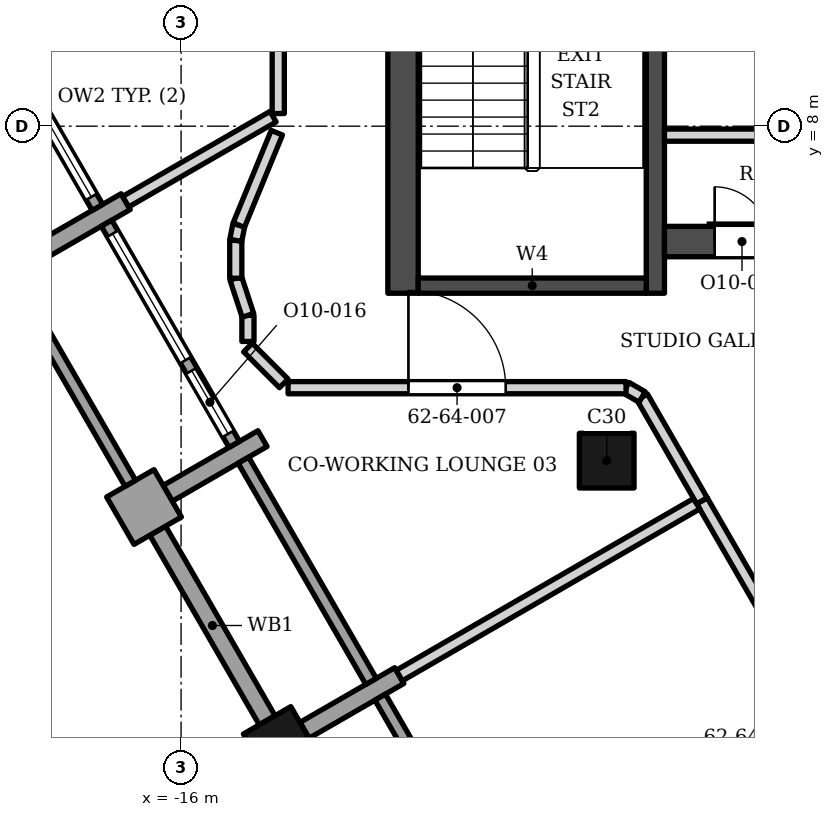
"""IFC4 building model, lengths in metres.
Left out: names, types, materials, properties, quantities, classifications, styles, units other than length and angle.
Written with IfcOpenShell. Run it as: python <this file> out.ifc"""

import sys

from ifc_helpers import new_model, si_unit, direction, frame, frame_2d, origin, origin_2d, place, context, subcontext, project, spatial, rectangle, extrude, element, fill, save


model = new_model("IFC4")
c1 = context("Model", 3, precision=1e-05, world=origin(), true_north=direction((0.0, 1.0)))
c2 = subcontext(c1, "Body", "Model", "MODEL_VIEW")
j1 = project(units=[si_unit("LENGTHUNIT", "METRE"), si_unit("PLANEANGLEUNIT", "RADIAN")], contexts=[c1])
p1 = place(None, origin())
s1 = spatial("IfcSite", under=j1, at=p1, CompositionType="ELEMENT")
p2 = place(p1, origin())
s2 = spatial("IfcBuilding", under=s1, at=p2, CompositionType="ELEMENT")
p3 = place(p2, frame((0.0, 0.0, 259.9)))
s3 = spatial("IfcBuildingStorey", under=s2, at=p3, CompositionType="ELEMENT", Elevation=259.9)
p4 = place(p3, frame((-12.35, 5.253, 0.0), z_axis=(0.0, 0.0, 1.0), x_axis=(0.0, 1.0, 0.0)))
e1 = element("IfcWall", 1, at=p4, inside=s3, PredefinedType="SHEAR", context=c2, shape_type="SweptSolid", body=[
    extrude(rectangle(XDim=13.8, YDim=0.5, at=frame_2d((6.9, 0.0))), origin(), (0.0, 0.0, 1.0), 3.9),
])
p5 = place(p3, frame((-8.2, 5.253, 0.0), z_axis=(0.0, 0.0, 1.0), x_axis=(0.0, 1.0, 0.0)))
e2 = element("IfcWall", 2, at=p5, inside=s3, PredefinedType="SHEAR", context=c2, shape_type="SweptSolid", body=[
    extrude(rectangle(XDim=13.3, YDim=0.3, at=frame_2d((6.65, 0.0))), origin(), (0.0, 0.0, 1.0), 3.9),
])
p6 = place(p5, frame((7.1, 0.0, 0.0)))
e3 = element("IfcOpeningElement", 3, at=p6, cuts=e2, PredefinedType="OPENING", context=c2, shape_type="SweptSolid", body=[
    extrude(rectangle(XDim=1.4, YDim=2.1, at=frame_2d((0.7, 1.05))), frame((0.0, 0.16, 0.0), z_axis=(0.0, -1.0, 0.0), x_axis=(1.0, 0.0, 0.0)), (0.0, 0.0, 1.0), 0.32),
])
p7 = place(p5, frame((5.05, 0.0, 0.0)))
e4 = element("IfcOpeningElement", 4, at=p7, cuts=e2, PredefinedType="OPENING", context=c2, shape_type="SweptSolid", body=[
    extrude(rectangle(XDim=1.4, YDim=2.1, at=frame_2d((0.7, 1.05))), frame((0.0, 0.16, 0.0), z_axis=(0.0, -1.0, 0.0), x_axis=(1.0, 0.0, 0.0)), (0.0, 0.0, 1.0), 0.32),
])
p8 = place(p3, frame((-12.1, 5.378, 0.0), z_axis=(0.0, 0.0, 1.0), x_axis=(1.0, 0.0, 0.0)))
e5 = element("IfcWall", 5, at=p8, inside=s3, PredefinedType="SHEAR", context=c2, shape_type="SweptSolid", body=[
    extrude(rectangle(XDim=3.75, YDim=0.25, at=frame_2d((1.875, 0.0))), origin(), (0.0, 0.0, 1.0), 3.9),
])
p9 = place(p3, frame((-8.05, 6.103, 0.0), z_axis=(0.0, 0.0, 1.0), x_axis=(1.0, 0.0, 0.0)))
e6 = element("IfcWall", 6, at=p9, inside=s3, PredefinedType="SHEAR", context=c2, shape_type="SweptSolid", body=[
    extrude(rectangle(XDim=7.05, YDim=0.5, at=frame_2d((3.525, 0.0))), origin(), (0.0, 0.0, 1.0), 3.9),
])
p10 = place(p9, frame((0.825, 0.0, 0.0)))
e7 = element("IfcOpeningElement", 7, at=p10, cuts=e6, PredefinedType="OPENING", context=c2, shape_type="SweptSolid", body=[
    extrude(rectangle(XDim=0.9, YDim=2.1, at=frame_2d((0.45, 1.05))), frame((0.0, 0.26, 0.0), z_axis=(0.0, -1.0, 0.0), x_axis=(1.0, 0.0, 0.0)), (0.0, 0.0, 1.0), 0.52),
])
for number, where, z_axis, x_axis in (
    (8, (-9.0, 2.5, 0.0), (0.0, 0.0, 1.0), (1.0, 0.0, 0.0)),
    (9, (-14.36, -2.16, 0.0), (0.0, 0.0, 1.0), (0.5, -0.866, 0.0)),
):
    element("IfcColumn", number, at=place(p3, frame(where, z_axis=z_axis, x_axis=x_axis)), inside=s3, PredefinedType="COLUMN", context=c2, shape_type="SweptSolid", body=[
        extrude(rectangle(XDim=0.9, YDim=0.9, at=origin_2d()), origin(), (0.0, 0.0, 1.0), 3.9),
    ])
p11 = place(p3, frame((-16.911, 6.759, 0.0), z_axis=(0.0, 0.0, 1.0), x_axis=(-0.866047807691, -0.499961193289, 0.0)))
e10 = element("IfcWall", 10, at=p11, inside=s3, PredefinedType="SOLIDWALL", context=c2, shape_type="SweptSolid", body=[
    extrude(rectangle(XDim=1.8, YDim=0.3, at=frame_2d((0.9, 0.0))), origin(), (0.0, 0.0, 1.0), 2.95),
])
p12 = place(p3, frame((-16.834, 2.127, 0.0), z_axis=(0.0, 0.0, 1.0), x_axis=(0.499902469156, -0.866081705922, 0.0)))
e11 = element("IfcWall", 11, at=p12, inside=s3, PredefinedType="SOLIDWALL", context=c2, shape_type="SweptSolid", body=[
    extrude(rectangle(XDim=0.9, YDim=0.9, at=frame_2d((0.45, 0.0))), origin(), (0.0, 0.0, 1.0), 3.0),
])
for number, where, z_axis, x_axis in (
    (12, (-16.22, 1.962, 0.0), (0.0, 0.0, 1.0), (0.866, 0.5, 0.0)),
    (13, (-12.411, -1.035, 0.0), (0.0, 0.0, 1.0), (-0.866, -0.5, 0.0)),
):
    element("IfcWall", number, at=place(p3, frame(where, z_axis=z_axis, x_axis=x_axis)), inside=s3, PredefinedType="SOLIDWALL", context=c2, shape_type="SweptSolid", body=[
        extrude(rectangle(XDim=1.8, YDim=0.3, at=frame_2d((0.9, 0.0))), origin(), (0.0, 0.0, 1.0), 3.0),
    ])
p13 = place(p3, frame((-19.476, 10.302, 0.0), z_axis=(0.0, 0.0, 1.0), x_axis=(0.49998411664, -0.866034573852, 0.0)))
e14 = element("IfcWall", 14, at=p13, inside=s3, PredefinedType="ELEMENTEDWALL", context=c2, shape_type="SweptSolid", body=[
    extrude(rectangle(XDim=4.2, YDim=0.2, at=frame_2d((2.1, 0.0))), origin(), (0.0, 0.0, 1.0), 3.0),
])
p14 = place(p13, frame((0.2, 0.0, 0.45)))
e15 = element("IfcOpeningElement", 15, at=p14, cuts=e14, PredefinedType="OPENING", context=c2, shape_type="SweptSolid", body=[
    extrude(rectangle(XDim=3.8, YDim=2.25, at=frame_2d((1.9, 1.125))), frame((0.0, 0.11, 0.0), z_axis=(0.0, -1.0, 0.0), x_axis=(1.0, 0.0, 0.0)), (0.0, 0.0, 1.0), 0.22),
])
p15 = place(p3, frame((-18.635, 5.245, 0.0), z_axis=(0.0, 0.0, 1.0), x_axis=(0.500012057535, -0.866018442252, 0.0)))
e16 = element("IfcWall", 16, at=p15, inside=s3, PredefinedType="SOLIDWALL", context=c2, shape_type="SweptSolid", body=[
    extrude(rectangle(XDim=3.6, YDim=0.2, at=frame_2d((1.8, 0.0))), origin(), (0.0, 0.0, 1.0), 3.0),
])
p16 = place(p3, frame((-17.226, 6.405, 0.0), z_axis=(0.0, 0.0, 1.0), x_axis=(0.499958946799, -0.866049104564, 0.0)))
e17 = element("IfcWall", 17, at=p16, inside=s3, PredefinedType="ELEMENTEDWALL", context=c2, shape_type="SweptSolid", body=[
    extrude(rectangle(XDim=4.2, YDim=0.2, at=frame_2d((2.1, 0.0))), origin(), (0.0, 0.0, 1.0), 2.95),
])
p17 = place(p16, frame((0.2, 0.0, 0.45)))
e18 = element("IfcOpeningElement", 18, at=p17, cuts=e17, PredefinedType="OPENING", context=c2, shape_type="SweptSolid", body=[
    extrude(rectangle(XDim=2.4, YDim=2.25, at=frame_2d((1.2, 1.125))), frame((0.0, 0.11, 0.0), z_axis=(0.0, -1.0, 0.0), x_axis=(1.0, 0.0, 0.0)), (0.0, 0.0, 1.0), 0.22),
])
p18 = place(p16, frame((2.8, 0.0, 0.0)))
e19 = element("IfcOpeningElement", 19, at=p18, cuts=e17, PredefinedType="OPENING", context=c2, shape_type="SweptSolid", body=[
    extrude(rectangle(XDim=1.2, YDim=2.7, at=frame_2d((0.6, 1.35))), frame((0.0, 0.11, 0.0), z_axis=(0.0, -1.0, 0.0), x_axis=(1.0, 0.0, 0.0)), (0.0, 0.0, 1.0), 0.22),
])
p19 = place(p3, frame((-16.385, 1.347, 0.0), z_axis=(0.0, 0.0, 1.0), x_axis=(0.500012057535, -0.866018442252, 0.0)))
e20 = element("IfcWall", 20, at=p19, inside=s3, PredefinedType="SOLIDWALL", context=c2, shape_type="SweptSolid", body=[
    extrude(rectangle(XDim=3.6, YDim=0.3, at=frame_2d((1.8, 0.0))), origin(), (0.0, 0.0, 1.0), 3.0),
])
for number, where, z_axis, x_axis in (
    (21, (-14.976, 2.507, 0.0), (0.0, 0.0, 1.0), (0.5, -0.866, 0.0)),
    (22, (-12.726, -1.39, 0.0), (0.0, 0.0, 1.0), (0.5, -0.866, 0.0)),
):
    element("IfcWall", number, at=place(p3, frame(where, z_axis=z_axis, x_axis=x_axis)), inside=s3, PredefinedType="ELEMENTEDWALL", context=c2, shape_type="SweptSolid", body=[
        extrude(rectangle(XDim=4.2, YDim=0.2, at=frame_2d((2.1, 0.0))), origin(), (0.0, 0.0, 1.0), 3.0),
    ])
p20 = place(p3, frame((-8.05, 7.853, 0.0), z_axis=(0.0, 0.0, 1.0), x_axis=(1.0, 0.0, 0.0)))
e23 = element("IfcWall", 23, at=p20, inside=s3, PredefinedType="SOLIDWALL", context=c2, shape_type="SweptSolid", body=[
    extrude(rectangle(XDim=2.5, YDim=0.2, at=frame_2d((1.25, 0.0))), origin(), (0.0, 0.0, 1.0), 3.73),
])
p21 = place(p3, frame((-7.433, 1.839, 0.0), z_axis=(0.0, 0.0, 1.0), x_axis=(0.500005992518, -0.866021943975, 0.0)))
e24 = element("IfcWall", 24, at=p21, inside=s3, PredefinedType="PARTITIONING", context=c2, shape_type="SweptSolid", body=[
    extrude(rectangle(XDim=13.764, YDim=0.2, at=frame_2d((6.882, 0.0))), origin(), (0.0, 0.0, 1.0), 2.884),
])
p22 = place(p21, frame((3.7, 0.0, 0.0)))
e25 = element("IfcOpeningElement", 25, at=p22, cuts=e24, PredefinedType="OPENING", context=c2, shape_type="SweptSolid", body=[
    extrude(rectangle(XDim=1.6, YDim=2.1, at=frame_2d((0.8, 1.05))), frame((0.0, 0.11, 0.0), z_axis=(0.0, -1.0, 0.0), x_axis=(1.0, 0.0, 0.0)), (0.0, 0.0, 1.0), 0.22),
])
p23 = place(p21, frame((10.85, 0.0, 0.0)))
e26 = element("IfcOpeningElement", 26, at=p23, cuts=e24, PredefinedType="OPENING", context=c2, shape_type="SweptSolid", body=[
    extrude(rectangle(XDim=0.8, YDim=2.1, at=frame_2d((0.4, 1.05))), frame((0.0, 0.11, 0.0), z_axis=(0.0, -1.0, 0.0), x_axis=(1.0, 0.0, 0.0)), (0.0, 0.0, 1.0), 0.22),
])
p24 = place(p3, frame((-12.411, -1.034, 0.0), z_axis=(0.0, 0.0, 1.0), x_axis=(0.865901262238, 0.500214957848, 0.0)))
e27 = element("IfcWall", 27, at=p24, inside=s3, PredefinedType="PARTITIONING", context=c2, shape_type="SweptSolid", body=[
    extrude(rectangle(XDim=5.649, YDim=0.2, at=frame_2d((2.825, 0.0))), origin(), (0.0, 0.0, 1.0), 3.052),
])
p25 = place(p3, frame((-8.417, 3.546, 0.0), z_axis=(0.0, 0.0, 1.0), x_axis=(0.499325430766, -0.866414516378, 0.0)))
e28 = element("IfcWall", 28, at=p25, inside=s3, PredefinedType="PARTITIONING", context=c2, shape_type="SweptSolid", body=[
    extrude(rectangle(XDim=1.97, YDim=0.2, at=frame_2d((0.985, 0.0))), origin(), (0.0, 0.0, 1.0), 3.73),
])
p26 = place(p3, frame((-8.682, 3.699, 0.0), z_axis=(0.0, 0.0, 1.0), x_axis=(0.866026229868, -0.499998569178, 0.0)))
e29 = element("IfcWall", 29, at=p26, inside=s3, PredefinedType="PARTITIONING", context=c2, shape_type="SweptSolid", body=[
    extrude(rectangle(XDim=0.306, YDim=0.2, at=frame_2d((0.153, 0.0))), origin(), (0.0, 0.0, 1.0), 3.73),
])
p27 = place(p3, frame((-14.24, 3.7, 0.0), z_axis=(0.0, 0.0, 1.0), x_axis=(0.999999999035, -4.3925151e-05, 0.0)))
e30 = element("IfcWall", 30, at=p27, inside=s3, PredefinedType="PARTITIONING", context=c2, shape_type="SweptSolid", body=[
    extrude(rectangle(XDim=5.558, YDim=0.2, at=frame_2d((2.779, 0.0))), origin(), (0.0, 0.0, 1.0), 3.73),
])
p28 = place(p27, frame((1.979, 0.0, 0.0)))
e31 = element("IfcOpeningElement", 31, at=p28, cuts=e30, PredefinedType="OPENING", context=c2, shape_type="SweptSolid", body=[
    extrude(rectangle(XDim=1.6, YDim=2.1, at=frame_2d((0.8, 1.05))), frame((0.0, 0.11, 0.0), z_axis=(0.0, -1.0, 0.0), x_axis=(1.0, 0.0, 0.0)), (0.0, 0.0, 1.0), 0.22),
])
p29 = place(p3, frame((-14.9, 4.36, 0.0), z_axis=(0.0, 0.0, 1.0), x_axis=(0.706960336792, -0.707253195258, 0.0)))
e32 = element("IfcWall", 32, at=p29, inside=s3, PredefinedType="PARTITIONING", context=c2, shape_type="SweptSolid", body=[
    extrude(rectangle(XDim=0.834, YDim=0.2, at=frame_2d((0.417, 0.0))), origin(), (0.0, 0.0, 1.0), 3.73),
])
p30 = place(p3, frame((-14.9, 4.889, 0.0), z_axis=(0.0, 0.0, 1.0), x_axis=(0.0, -1.0, 0.0)))
e33 = element("IfcWall", 33, at=p30, inside=s3, PredefinedType="PARTITIONING", context=c2, shape_type="SweptSolid", body=[
    extrude(rectangle(XDim=0.43, YDim=0.2, at=frame_2d((0.215, 0.0))), origin(), (0.0, 0.0, 1.0), 3.73),
])
p31 = place(p3, frame((-15.101, 5.5, 0.0), z_axis=(0.0, 0.0, 1.0), x_axis=(0.311775781287, -0.950155704189, 0.0)))
e34 = element("IfcWall", 34, at=p31, inside=s3, PredefinedType="PARTITIONING", context=c2, shape_type="SweptSolid", body=[
    extrude(rectangle(XDim=0.642, YDim=0.2, at=frame_2d((0.321, 0.0))), origin(), (0.0, 0.0, 1.0), 3.73),
])
p32 = place(p3, frame((-15.101, 5.5, 0.0), z_axis=(0.0, 0.0, 1.0), x_axis=(0.0, 1.0, 0.0)))
e35 = element("IfcWall", 35, at=p32, inside=s3, PredefinedType="PARTITIONING", context=c2, shape_type="SweptSolid", body=[
    extrude(rectangle(XDim=0.623, YDim=0.2, at=frame_2d((0.311, 0.0))), origin(), (0.0, 0.0, 1.0), 2.95),
])
p33 = place(p3, frame((-15.101, 6.122, 0.0), z_axis=(0.0, 0.0, 1.0), x_axis=(0.194465976514, 0.980909263887, 0.0)))
e36 = element("IfcWall", 36, at=p33, inside=s3, PredefinedType="PARTITIONING", context=c2, shape_type="SweptSolid", body=[
    extrude(rectangle(XDim=0.256, YDim=0.2, at=frame_2d((0.128, 0.0))), origin(), (0.0, 0.0, 1.0), 2.95),
])
p34 = place(p3, frame((-15.051, 6.373, 0.0), z_axis=(0.0, 0.0, 1.0), x_axis=(0.380772221762, 0.92466886783, 0.0)))
e37 = element("IfcWall", 37, at=p34, inside=s3, PredefinedType="PARTITIONING", context=c2, shape_type="SweptSolid", body=[
    extrude(rectangle(XDim=1.643, YDim=0.2, at=frame_2d((0.822, 0.0))), origin(), (0.0, 0.0, 1.0), 3.73),
])
p35 = place(p3, frame((-16.911, 6.759, 0.0), z_axis=(0.0, 0.0, 1.0), x_axis=(0.866362772616, 0.499415204239, 0.0)))
e38 = element("IfcWall", 38, at=p35, inside=s3, PredefinedType="PARTITIONING", context=c2, shape_type="SweptSolid", body=[
    extrude(rectangle(XDim=2.798, YDim=0.2, at=frame_2d((1.399, 0.0))), origin(), (0.0, 0.0, 1.0), 3.73),
])
p36 = place(p3, frame((-14.402, 8.208, 0.0), z_axis=(0.0, 0.0, 1.0), x_axis=(0.000241221262, 0.999999970906, 0.0)))
e39 = element("IfcWall", 39, at=p36, inside=s3, PredefinedType="PARTITIONING", context=c2, shape_type="SweptSolid", body=[
    extrude(rectangle(XDim=7.085, YDim=0.2, at=frame_2d((3.542, 0.0))), origin(), (0.0, 0.0, 1.0), 3.73),
])
p37 = place(p36, frame((2.643, 0.0, 0.0)))
e40 = element("IfcOpeningElement", 40, at=p37, cuts=e39, PredefinedType="OPENING", context=c2, shape_type="SweptSolid", body=[
    extrude(rectangle(XDim=1.8, YDim=2.4, at=frame_2d((0.9, 1.2))), frame((0.0, 0.11, 0.0), z_axis=(0.0, -1.0, 0.0), x_axis=(1.0, 0.0, 0.0)), (0.0, 0.0, 1.0), 0.22),
])
p38 = place(p14, origin())
e41 = element("IfcWindow", 41, at=p38, inside=s3, PartitioningType="SINGLE_PANEL", PredefinedType="WINDOW", context=c2, shape_type="SweptSolid", body=[
    extrude(rectangle(XDim=3.8, YDim=2.25, at=frame_2d((1.9, 1.125))), frame((0.0, 0.03, 0.0), z_axis=(0.0, -1.0, 0.0), x_axis=(1.0, 0.0, 0.0)), (0.0, 0.0, 1.0), 0.06),
])
fill(e15, e41)
p39 = place(p17, origin())
e42 = element("IfcWindow", 42, at=p39, inside=s3, PartitioningType="SINGLE_PANEL", PredefinedType="WINDOW", context=c2, shape_type="SweptSolid", body=[
    extrude(rectangle(XDim=2.4, YDim=2.25, at=frame_2d((1.2, 1.125))), frame((0.0, 0.03, 0.0), z_axis=(0.0, -1.0, 0.0), x_axis=(1.0, 0.0, 0.0)), (0.0, 0.0, 1.0), 0.06),
])
fill(e18, e42)
p40 = place(p18, origin())
e43 = element("IfcDoor", 43, at=p40, inside=s3, OperationType="SINGLE_SWING_LEFT", PredefinedType="DOOR", context=c2, shape_type="SweptSolid", body=[
    extrude(rectangle(XDim=1.2, YDim=2.7, at=frame_2d((0.6, 1.35))), frame((0.0, 0.025, 0.0), z_axis=(0.0, -1.0, 0.0), x_axis=(1.0, 0.0, 0.0)), (0.0, 0.0, 1.0), 0.05),
])
fill(e19, e43)
p41 = place(p10, origin())
e44 = element("IfcDoor", 44, at=p41, inside=s3, OperationType="SINGLE_SWING_LEFT", PredefinedType="DOOR", context=c2, shape_type="SweptSolid", body=[
    extrude(rectangle(XDim=0.9, YDim=2.1, at=frame_2d((0.45, 1.05))), frame((0.0, 0.025, 0.0), z_axis=(0.0, -1.0, 0.0), x_axis=(1.0, 0.0, 0.0)), (0.0, 0.0, 1.0), 0.05),
])
fill(e7, e44)
p42 = place(p28, origin())
e45 = element("IfcDoor", 45, at=p42, inside=s3, OperationType="DOUBLE_DOOR_SINGLE_SWING", PredefinedType="DOOR", context=c2, shape_type="SweptSolid", body=[
    extrude(rectangle(XDim=1.6, YDim=2.1, at=frame_2d((0.8, 1.05))), frame((0.0, 0.025, 0.0), z_axis=(0.0, -1.0, 0.0), x_axis=(1.0, 0.0, 0.0)), (0.0, 0.0, 1.0), 0.05),
])
fill(e31, e45)
save(model, sys.argv[1])
